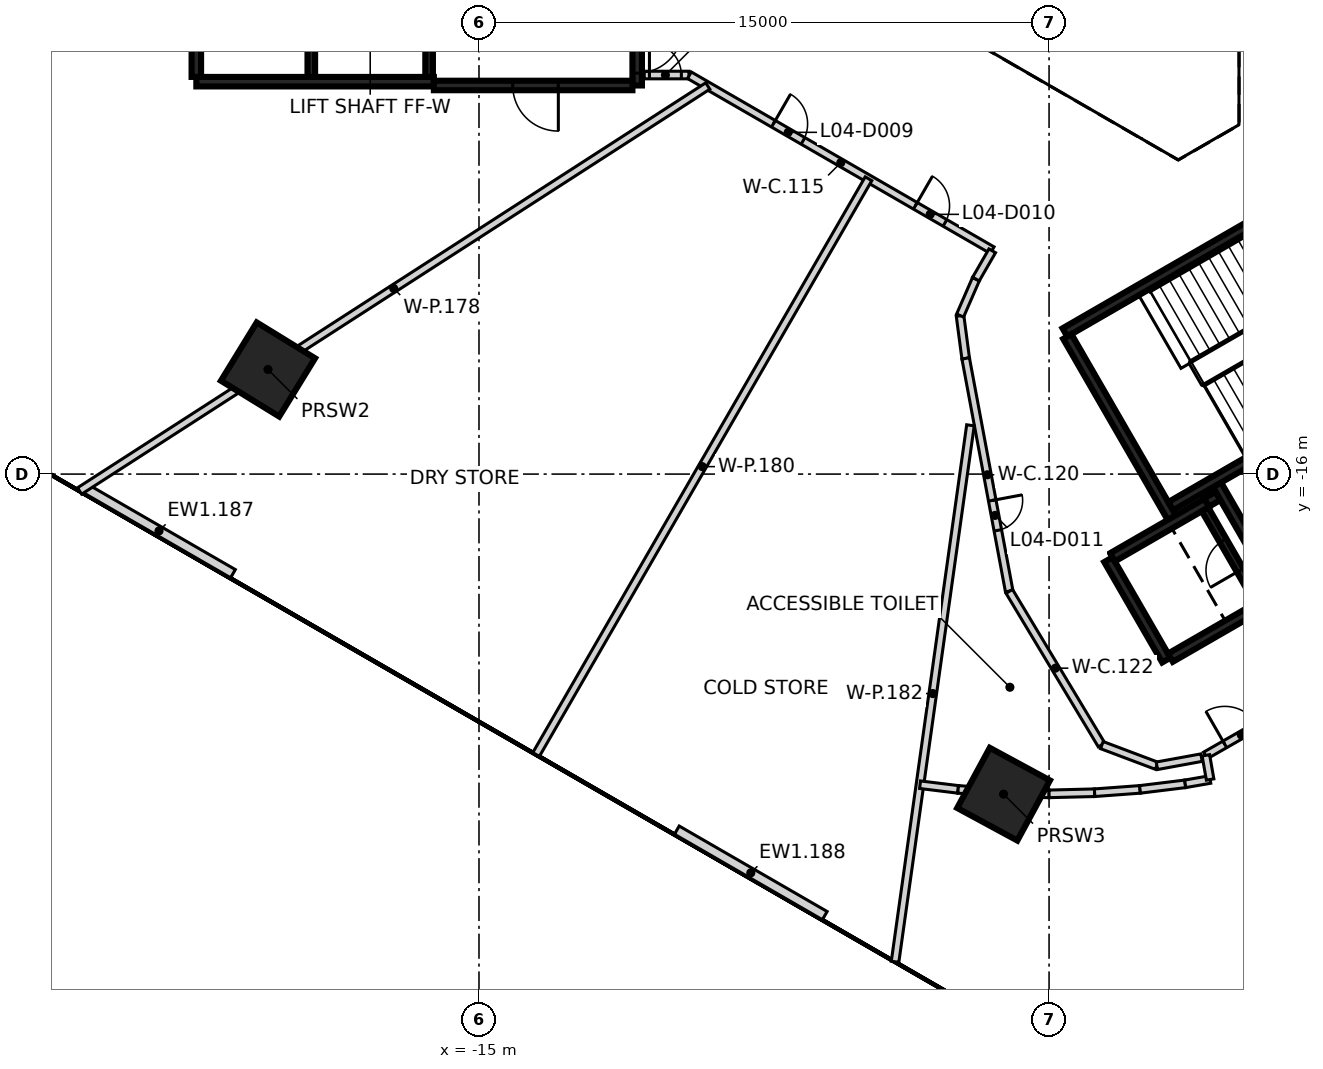
"""IFC4 building model, lengths in metres.
Left out: names, types, materials, properties, quantities, classifications, styles, units other than length and angle.
Written with IfcOpenShell. Run it as: python <this file> out.ifc"""

import sys

from ifc_helpers import new_model, si_unit, direction, frame, frame_2d, origin, origin_2d, place, context, subcontext, project, spatial, rectangle, extrude, element, fill, save


model = new_model("IFC4")
c1 = context("Model", 3, precision=1e-05, world=origin(), true_north=direction((0.0, 1.0)))
c2 = subcontext(c1, "Body", "Model", "MODEL_VIEW")
j1 = project(units=[si_unit("LENGTHUNIT", "METRE"), si_unit("PLANEANGLEUNIT", "RADIAN")], contexts=[c1])
p1 = place(None, origin())
s1 = spatial("IfcSite", under=j1, at=p1, CompositionType="ELEMENT")
p2 = place(p1, origin())
s2 = spatial("IfcBuilding", under=s1, at=p2, CompositionType="ELEMENT")
p3 = place(p2, frame((0.0, 0.0, 24.5)))
s3 = spatial("IfcBuildingStorey", under=s2, at=p3, CompositionType="ELEMENT", Elevation=24.5)
for number, where, z_axis, x_axis in (
    (1, (-20.552, -13.248, -0.45), (0.0, 0.0, 1.0), (0.523, 0.852, 0.0)),
    (2, (-1.197, -24.423, -0.45), (0.0, 0.0, 1.0), (0.476, 0.879, 0.0)),
):
    element("IfcColumn", number, at=place(p3, frame(where, z_axis=z_axis, x_axis=x_axis)), inside=s3, PredefinedType="COLUMN", context=c2, shape_type="SweptSolid", body=[
        extrude(rectangle(XDim=1.8, YDim=1.8, at=origin_2d()), origin(), (0.0, 0.0, 1.0), 5.05),
    ])
p4 = place(p3, frame((-21.473, -18.621, 0.0), z_axis=(0.0, 0.0, 1.0), x_axis=(-0.865894343596, 0.500226934229, 0.0)))
e3 = element("IfcWall", 3, at=p4, inside=s3, PredefinedType="SOLIDWALL", context=c2, shape_type="SweptSolid", body=[
    extrude(rectangle(XDim=4.496, YDim=0.25, at=frame_2d((2.248, 0.0))), origin(), (0.0, 0.0, 1.0), 4.6),
])
p5 = place(p3, frame((-5.902, -27.617, 0.0), z_axis=(0.0, 0.0, 1.0), x_axis=(-0.865880754896, 0.500250455572, 0.0)))
e4 = element("IfcWall", 4, at=p5, inside=s3, PredefinedType="SOLIDWALL", context=c2, shape_type="SweptSolid", body=[
    extrude(rectangle(XDim=4.496, YDim=0.25, at=frame_2d((2.248, 0.0))), origin(), (0.0, 0.0, 1.0), 4.6),
])
p6 = place(p3, frame((-10.837, 5.775, 0.0), z_axis=(0.0, 0.0, 1.0), x_axis=(0.0, -1.0, 0.0)))
e5 = element("IfcWall", 5, at=p6, inside=s3, PredefinedType="SHEAR", context=c2, shape_type="SweptSolid", body=[
    extrude(rectangle(XDim=11.55, YDim=0.25, at=frame_2d((5.775, 0.0))), origin(), (0.0, 0.0, 1.0), 4.6),
])
p7 = place(p6, frame((10.025, 0.0, 0.0)))
e6 = element("IfcOpeningElement", 6, at=p7, cuts=e5, PredefinedType="OPENING", context=c2, shape_type="SweptSolid", body=[
    extrude(rectangle(XDim=1.2, YDim=2.1, at=frame_2d((0.6, 1.05))), frame((0.0, 0.135, 0.0), z_axis=(0.0, -1.0, 0.0), x_axis=(1.0, 0.0, 0.0)), (0.0, 0.0, 1.0), 0.27),
])
p8 = place(p6, frame((8.725, 0.0, 0.0)))
e7 = element("IfcOpeningElement", 7, at=p8, cuts=e5, PredefinedType="OPENING", context=c2, shape_type="SweptSolid", body=[
    extrude(rectangle(XDim=1.2, YDim=2.1, at=frame_2d((0.6, 1.05))), frame((0.0, 0.135, 0.0), z_axis=(0.0, -1.0, 0.0), x_axis=(1.0, 0.0, 0.0)), (0.0, 0.0, 1.0), 0.27),
])
p9 = place(p3, frame((-16.187, -5.675, 0.0), z_axis=(0.0, 0.0, 1.0), x_axis=(-1.0, 0.0, 0.0)))
e8 = element("IfcWall", 8, at=p9, inside=s3, PredefinedType="SHEAR", context=c2, shape_type="SweptSolid", body=[
    extrude(rectangle(XDim=6.25, YDim=0.25, at=frame_2d((3.125, 0.0))), origin(), (0.0, 0.0, 1.0), 4.6),
])
p10 = place(p3, frame((-10.963, -5.775, 0.0), z_axis=(0.0, 0.0, 1.0), x_axis=(-1.0, 0.0, 0.0)))
e9 = element("IfcWall", 9, at=p10, inside=s3, PredefinedType="SHEAR", context=c2, shape_type="SweptSolid", body=[
    extrude(rectangle(XDim=5.225, YDim=0.25, at=frame_2d((2.612, 0.0))), origin(), (0.0, 0.0, 1.0), 4.6),
])
p11 = place(p10, frame((1.95, 0.0, 0.0)))
e10 = element("IfcOpeningElement", 10, at=p11, cuts=e9, PredefinedType="OPENING", context=c2, shape_type="SweptSolid", body=[
    extrude(rectangle(XDim=1.2, YDim=2.1, at=frame_2d((0.6, 1.05))), frame((0.0, 0.135, 0.0), z_axis=(0.0, -1.0, 0.0), x_axis=(1.0, 0.0, 0.0)), (0.0, 0.0, 1.0), 0.27),
])
p12 = place(p3, frame((-22.437, -5.55, 0.0), z_axis=(0.0, 0.0, 1.0), x_axis=(0.0, 1.0, 0.0)))
e11 = element("IfcWall", 11, at=p12, inside=s3, PredefinedType="SHEAR", context=c2, shape_type="SweptSolid", body=[
    extrude(rectangle(XDim=1.849, YDim=0.25, at=frame_2d((0.925, 0.0))), origin(), (0.0, 0.0, 1.0), 4.6),
])
p13 = place(p3, frame((-16.312, -2.898, 0.0), z_axis=(0.0, 0.0, 1.0), x_axis=(0.0, -1.0, 0.0)))
e12 = element("IfcWall", 12, at=p13, inside=s3, PredefinedType="SHEAR", context=c2, shape_type="SweptSolid", body=[
    extrude(rectangle(XDim=2.651, YDim=0.2, at=frame_2d((1.325, 0.0))), origin(), (0.0, 0.0, 1.0), 4.6),
])
p14 = place(p13, frame((0.652, 0.0, 0.0)))
e13 = element("IfcOpeningElement", 13, at=p14, cuts=e12, PredefinedType="OPENING", context=c2, shape_type="SweptSolid", body=[
    extrude(rectangle(XDim=1.3, YDim=2.1, at=frame_2d((0.65, 1.05))), frame((0.0, 0.11, 0.0), z_axis=(0.0, -1.0, 0.0), x_axis=(1.0, 0.0, 0.0)), (0.0, 0.0, 1.0), 0.22),
])
p15 = place(p3, frame((-19.412, -5.549, 0.0), z_axis=(0.0, 0.0, 1.0), x_axis=(0.0, 1.0, 0.0)))
e14 = element("IfcWall", 14, at=p15, inside=s3, PredefinedType="SHEAR", context=c2, shape_type="SweptSolid", body=[
    extrude(rectangle(XDim=2.651, YDim=0.2, at=frame_2d((1.325, 0.0))), origin(), (0.0, 0.0, 1.0), 4.6),
])
p16 = place(p3, frame((0.417, -12.273, 0.0), z_axis=(0.0, 0.0, 1.0), x_axis=(0.866021906294, 0.500006057782, 0.0)))
e15 = element("IfcWall", 15, at=p16, inside=s3, PredefinedType="SHEAR", context=c2, shape_type="SweptSolid", body=[
    extrude(rectangle(XDim=11.55, YDim=0.25, at=frame_2d((5.775, 0.0))), origin(), (0.0, 0.0, 1.0), 4.6),
])
p17 = place(p16, frame((10.025, 0.0, 0.0)))
e16 = element("IfcOpeningElement", 16, at=p17, cuts=e15, PredefinedType="OPENING", context=c2, shape_type="SweptSolid", body=[
    extrude(rectangle(XDim=1.2, YDim=2.1, at=frame_2d((0.6, 1.05))), frame((0.0, 0.135, 0.0), z_axis=(0.0, -1.0, 0.0), x_axis=(1.0, 0.0, 0.0)), (0.0, 0.0, 1.0), 0.27),
])
p18 = place(p16, frame((8.725, 0.0, 0.0)))
e17 = element("IfcOpeningElement", 17, at=p18, cuts=e15, PredefinedType="OPENING", context=c2, shape_type="SweptSolid", body=[
    extrude(rectangle(XDim=1.2, YDim=2.1, at=frame_2d((0.6, 1.05))), frame((0.0, 0.135, 0.0), z_axis=(0.0, -1.0, 0.0), x_axis=(1.0, 0.0, 0.0)), (0.0, 0.0, 1.0), 0.27),
])
p19 = place(p3, frame((3.235, -17.153, 0.0), z_axis=(0.0, 0.0, 1.0), x_axis=(-0.500008851346, 0.866020293397, 0.0)))
e18 = element("IfcWall", 18, at=p19, inside=s3, PredefinedType="SHEAR", context=c2, shape_type="SweptSolid", body=[
    extrude(rectangle(XDim=5.51, YDim=0.25, at=frame_2d((2.755, 0.0))), origin(), (0.0, 0.0, 1.0), 4.6),
])
p20 = place(p3, frame((3.085, -20.894, 0.0), z_axis=(0.0, 0.0, 1.0), x_axis=(-0.499978833458, 0.866037623948, 0.0)))
e19 = element("IfcWall", 19, at=p20, inside=s3, PredefinedType="SHEAR", context=c2, shape_type="SweptSolid", body=[
    extrude(rectangle(XDim=3.05, YDim=0.25, at=frame_2d((1.525, 0.0))), origin(), (0.0, 0.0, 1.0), 4.6),
])
p21 = place(p3, frame((1.669, -18.19, 0.0), z_axis=(0.0, 0.0, 1.0), x_axis=(0.866042235819, 0.499970844928, 0.0)))
e20 = element("IfcWall", 20, at=p21, inside=s3, PredefinedType="SHEAR", context=c2, shape_type="SweptSolid", body=[
    extrude(rectangle(XDim=2.865, YDim=0.25, at=frame_2d((1.432, 0.0))), origin(), (0.0, 0.0, 1.0), 4.6),
])
p22 = place(p3, frame((5.675, -19.399, 0.0), z_axis=(0.0, 0.0, 1.0), x_axis=(-0.866026637627, -0.499997862916, 0.0)))
e21 = element("IfcWall", 21, at=p22, inside=s3, PredefinedType="SHEAR", context=c2, shape_type="SweptSolid", body=[
    extrude(rectangle(XDim=2.865, YDim=0.25, at=frame_2d((1.432, 0.0))), origin(), (0.0, 0.0, 1.0), 4.6),
])
p23 = place(p3, frame((4.414, -16.276, 0.0), z_axis=(0.0, 0.0, 1.0), x_axis=(0.500003324108, -0.866023484601, 0.0)))
e22 = element("IfcWall", 22, at=p23, inside=s3, PredefinedType="SHEAR", context=c2, shape_type="SweptSolid", body=[
    extrude(rectangle(XDim=3.085, YDim=0.25, at=frame_2d((1.542, 0.0))), origin(), (0.0, 0.0, 1.0), 4.6),
])
p24 = place(p3, frame((5.322, -15.619, 0.0), z_axis=(0.0, 0.0, 1.0), x_axis=(-0.866026229868, -0.499998569178, 0.0)))
e23 = element("IfcWall", 23, at=p24, inside=s3, PredefinedType="SHEAR", context=c2, shape_type="SweptSolid", body=[
    extrude(rectangle(XDim=2.449, YDim=0.25, at=frame_2d((1.225, 0.0))), origin(), (0.0, 0.0, 1.0), 4.6),
])
p25 = place(p3, frame((4.145, -16.749, 0.0), z_axis=(0.0, 0.0, 1.0), x_axis=(0.866185586049, 0.49972245349, 0.0)))
e24 = element("IfcWall", 24, at=p25, inside=s3, PredefinedType="SHEAR", context=c2, shape_type="SweptSolid", body=[
    extrude(rectangle(XDim=0.344, YDim=0.25, at=frame_2d((0.172, 0.0))), origin(), (0.0, 0.0, 1.0), 4.6),
])
p26 = place(p3, frame((5.503, -19.352, 0.0), z_axis=(0.0, 0.0, 1.0), x_axis=(-0.499986818241, 0.866033014143, 0.0)))
e25 = element("IfcWall", 25, at=p26, inside=s3, PredefinedType="SHEAR", context=c2, shape_type="SweptSolid", body=[
    extrude(rectangle(XDim=2.798, YDim=0.2, at=frame_2d((1.399, 0.0))), origin(), (0.0, 0.0, 1.0), 4.6),
])
p27 = place(p26, frame((0.949, 0.0, 0.0)))
e26 = element("IfcOpeningElement", 26, at=p27, cuts=e25, PredefinedType="OPENING", context=c2, shape_type="SweptSolid", body=[
    extrude(rectangle(XDim=0.9, YDim=2.1, at=frame_2d((0.45, 1.05))), frame((0.0, 0.11, 0.0), z_axis=(0.0, -1.0, 0.0), x_axis=(1.0, 0.0, 0.0)), (0.0, 0.0, 1.0), 0.22),
])
p28 = place(p3, frame((-10.652, -5.5, 0.0), z_axis=(0.0, 0.0, 1.0), x_axis=(1.0, 0.0, 0.0)))
e27 = element("IfcWall", 27, at=p28, inside=s3, PredefinedType="PARTITIONING", context=c2, shape_type="SweptSolid", body=[
    extrude(rectangle(XDim=1.177, YDim=0.2, at=frame_2d((0.589, 0.0))), origin(), (0.0, 0.0, 1.0), 4.6),
])
p29 = place(p28, frame((0.137, 0.0, 0.0)))
e28 = element("IfcOpeningElement", 28, at=p29, cuts=e27, PredefinedType="OPENING", context=c2, shape_type="SweptSolid", body=[
    extrude(rectangle(XDim=0.84, YDim=2.1, at=frame_2d((0.42, 1.05))), frame((0.0, 0.11, 0.0), z_axis=(0.0, -1.0, 0.0), x_axis=(1.0, 0.0, 0.0)), (0.0, 0.0, 1.0), 0.22),
])
p30 = place(p3, frame((-9.463, -5.506, 0.0), z_axis=(0.0, 0.0, 1.0), x_axis=(0.865865073245, -0.500277597875, 0.0)))
e29 = element("IfcWall", 29, at=p30, inside=s3, PredefinedType="PARTITIONING", context=c2, shape_type="SweptSolid", body=[
    extrude(rectangle(XDim=9.199, YDim=0.2, at=frame_2d((4.6, 0.0))), origin(), (0.0, 0.0, 1.0), 4.6),
])
p31 = place(p30, frame((2.552, 0.0, 0.0)))
e30 = element("IfcOpeningElement", 30, at=p31, cuts=e29, PredefinedType="OPENING", context=c2, shape_type="SweptSolid", body=[
    extrude(rectangle(XDim=0.9, YDim=2.1, at=frame_2d((0.45, 1.05))), frame((0.0, 0.11, 0.0), z_axis=(0.0, -1.0, 0.0), x_axis=(1.0, 0.0, 0.0)), (0.0, 0.0, 1.0), 0.22),
])
p32 = place(p30, frame((6.866, 0.0, 0.0)))
e31 = element("IfcOpeningElement", 31, at=p32, cuts=e29, PredefinedType="OPENING", context=c2, shape_type="SweptSolid", body=[
    extrude(rectangle(XDim=0.9, YDim=2.1, at=frame_2d((0.45, 1.05))), frame((0.0, 0.11, 0.0), z_axis=(0.0, -1.0, 0.0), x_axis=(1.0, 0.0, 0.0)), (0.0, 0.0, 1.0), 0.22),
])
p33 = place(p3, frame((-2.342, -11.835, 0.0), z_axis=(0.0, 0.0, 1.0), x_axis=(0.130834272089, -0.991404253192, 0.0)))
e32 = element("IfcWall", 32, at=p33, inside=s3, PredefinedType="PARTITIONING", context=c2, shape_type="SweptSolid", body=[
    extrude(rectangle(XDim=1.131, YDim=0.2, at=frame_2d((0.565, 0.0))), origin(), (0.0, 0.0, 1.0), 4.6),
])
p34 = place(p3, frame((-2.341, -11.828, 0.0), z_axis=(0.0, 0.0, 1.0), x_axis=(0.399428841439, 0.916764201214, 0.0)))
e33 = element("IfcWall", 33, at=p34, inside=s3, PredefinedType="PARTITIONING", context=c2, shape_type="SweptSolid", body=[
    extrude(rectangle(XDim=1.042, YDim=0.2, at=frame_2d((0.521, 0.0))), origin(), (0.0, 0.0, 1.0), 4.6),
])
p35 = place(p3, frame((-2.194, -12.956, 0.0), z_axis=(0.0, 0.0, 1.0), x_axis=(0.183749054017, -0.982973186383, 0.0)))
e34 = element("IfcWall", 34, at=p35, inside=s3, PredefinedType="PARTITIONING", context=c2, shape_type="SweptSolid", body=[
    extrude(rectangle(XDim=6.23, YDim=0.2, at=frame_2d((3.115, 0.0))), origin(), (0.0, 0.0, 1.0), 4.6),
])
p36 = place(p35, frame((3.802, 0.0, 0.0)))
e35 = element("IfcOpeningElement", 35, at=p36, cuts=e34, PredefinedType="OPENING", context=c2, shape_type="SweptSolid", body=[
    extrude(rectangle(XDim=0.8, YDim=2.1, at=frame_2d((0.4, 1.05))), frame((0.0, 0.11, 0.0), z_axis=(0.0, -1.0, 0.0), x_axis=(1.0, 0.0, 0.0)), (0.0, 0.0, 1.0), 0.22),
])
p37 = place(p3, frame((-1.924, -10.869, 0.0), z_axis=(0.0, 0.0, 1.0), x_axis=(0.499533742691, 0.866294430268, 0.0)))
e36 = element("IfcWall", 36, at=p37, inside=s3, PredefinedType="PARTITIONING", context=c2, shape_type="SweptSolid", body=[
    extrude(rectangle(XDim=0.859, YDim=0.2, at=frame_2d((0.429, 0.0))), origin(), (0.0, 0.0, 1.0), 4.6),
])
p38 = place(p3, frame((-1.047, -19.086, 0.0), z_axis=(0.0, 0.0, 1.0), x_axis=(0.515211359032, -0.857063157255, 0.0)))
e37 = element("IfcWall", 37, at=p38, inside=s3, PredefinedType="PARTITIONING", context=c2, shape_type="SweptSolid", body=[
    extrude(rectangle(XDim=4.715, YDim=0.2, at=frame_2d((2.357, 0.0))), origin(), (0.0, 0.0, 1.0), 4.6),
])
p39 = place(p3, frame((1.389, -23.131, 0.0), z_axis=(0.0, 0.0, 1.0), x_axis=(0.935814533732, -0.352492777879, 0.0)))
e38 = element("IfcWall", 38, at=p39, inside=s3, PredefinedType="PARTITIONING", context=c2, shape_type="SweptSolid", body=[
    extrude(rectangle(XDim=1.543, YDim=0.2, at=frame_2d((0.771, 0.0))), origin(), (0.0, 0.0, 1.0), 4.6),
])
p40 = place(p3, frame((2.837, -23.675, 0.0), z_axis=(0.0, 0.0, 1.0), x_axis=(0.983774851332, 0.179407474447, 0.0)))
e39 = element("IfcWall", 39, at=p40, inside=s3, PredefinedType="PARTITIONING", context=c2, shape_type="SweptSolid", body=[
    extrude(rectangle(XDim=1.193, YDim=0.2, at=frame_2d((0.597, 0.0))), origin(), (0.0, 0.0, 1.0), 4.6),
])
p41 = place(p3, frame((4.116, -23.403, 0.0), z_axis=(0.0, 0.0, 1.0), x_axis=(0.867855523063, 0.49681665742, 0.0)))
e40 = element("IfcWall", 40, at=p41, inside=s3, PredefinedType="PARTITIONING", context=c2, shape_type="SweptSolid", body=[
    extrude(rectangle(XDim=2.172, YDim=0.2, at=frame_2d((1.086, 0.0))), origin(), (0.0, 0.0, 1.0), 4.6),
])
p42 = place(p41, frame((0.586, 0.0, 0.0)))
e41 = element("IfcOpeningElement", 41, at=p42, cuts=e40, PredefinedType="OPENING", context=c2, shape_type="SweptSolid", body=[
    extrude(rectangle(XDim=1.0, YDim=2.1, at=frame_2d((0.5, 1.05))), frame((0.0, 0.11, 0.0), z_axis=(0.0, -1.0, 0.0), x_axis=(1.0, 0.0, 0.0)), (0.0, 0.0, 1.0), 0.22),
])
p43 = place(p3, frame((-25.509, -16.444, 0.0), z_axis=(0.0, 0.0, 1.0), x_axis=(0.840502189504, 0.541808148184, 0.0)))
e42 = element("IfcWall", 42, at=p43, inside=s3, PredefinedType="PARTITIONING", context=c2, shape_type="SweptSolid", body=[
    extrude(rectangle(XDim=19.666, YDim=0.2, at=frame_2d((9.833, 0.0))), origin(), (0.0, 0.0, 1.0), 4.6),
])
p44 = place(p3, frame((-13.498, -23.378, 0.0), z_axis=(0.0, 0.0, 1.0), x_axis=(0.500002732974, 0.866023825895, 0.0)))
e43 = element("IfcWall", 43, at=p44, inside=s3, PredefinedType="PARTITIONING", context=c2, shape_type="SweptSolid", body=[
    extrude(rectangle(XDim=17.493, YDim=0.2, at=frame_2d((8.747, 0.0))), origin(), (0.0, 0.0, 1.0), 4.6),
])
p45 = place(p3, frame((-4.052, -28.832, 0.0), z_axis=(0.0, 0.0, 1.0), x_axis=(0.139178988917, 0.990267241225, 0.0)))
e44 = element("IfcWall", 44, at=p45, inside=s3, PredefinedType="PARTITIONING", context=c2, shape_type="SweptSolid", body=[
    extrude(rectangle(XDim=14.254, YDim=0.2, at=frame_2d((7.127, 0.0))), origin(), (0.0, 0.0, 1.0), 4.6),
])
p46 = place(p3, frame((-3.395, -24.173, 0.0), z_axis=(0.0, 0.0, 1.0), x_axis=(0.992572686874, -0.121653036427, 0.0)))
e45 = element("IfcWall", 45, at=p46, inside=s3, PredefinedType="PARTITIONING", context=c2, shape_type="SweptSolid", body=[
    extrude(rectangle(XDim=1.01, YDim=0.2, at=frame_2d((0.505, 0.0))), origin(), (0.0, 0.0, 1.0), 4.6),
])
p47 = place(p3, frame((-2.393, -24.296, 0.0), z_axis=(0.0, 0.0, 1.0), x_axis=(0.997291605881, -0.073548982579, 0.0)))
e46 = element("IfcWall", 46, at=p47, inside=s3, PredefinedType="PARTITIONING", context=c2, shape_type="SweptSolid", body=[
    extrude(rectangle(XDim=1.198, YDim=0.2, at=frame_2d((0.599, 0.0))), origin(), (0.0, 0.0, 1.0), 4.6),
])
for number, where, z_axis, x_axis in (
    (47, (-1.198, -24.384, 0.0), (0.0, 0.0, 1.0), (1.0, -0.025, 0.0)),
    (48, (0.0, -24.414, 0.0), (0.0, 0.0, 1.0), (1.0, 0.025, 0.0)),
):
    element("IfcWall", number, at=place(p3, frame(where, z_axis=z_axis, x_axis=x_axis)), inside=s3, PredefinedType="PARTITIONING", context=c2, shape_type="SweptSolid", body=[
        extrude(rectangle(XDim=1.198, YDim=0.2, at=frame_2d((0.599, 0.0))), origin(), (0.0, 0.0, 1.0), 4.6),
    ])
p48 = place(p3, frame((1.198, -24.384, 0.0), z_axis=(0.0, 0.0, 1.0), x_axis=(0.997291605881, 0.073548982579, 0.0)))
e49 = element("IfcWall", 49, at=p48, inside=s3, PredefinedType="PARTITIONING", context=c2, shape_type="SweptSolid", body=[
    extrude(rectangle(XDim=1.198, YDim=0.2, at=frame_2d((0.599, 0.0))), origin(), (0.0, 0.0, 1.0), 4.6),
])
p49 = place(p3, frame((2.393, -24.296, 0.0), z_axis=(0.0, 0.0, 1.0), x_axis=(0.992545185506, 0.12187721169, 0.0)))
e50 = element("IfcWall", 50, at=p49, inside=s3, PredefinedType="PARTITIONING", context=c2, shape_type="SweptSolid", body=[
    extrude(rectangle(XDim=1.198, YDim=0.2, at=frame_2d((0.599, 0.0))), origin(), (0.0, 0.0, 1.0), 4.6),
])
p50 = place(p3, frame((3.582, -24.15, 0.0), z_axis=(0.0, 0.0, 1.0), x_axis=(0.985230586733, 0.171232855975, 0.0)))
e51 = element("IfcWall", 51, at=p50, inside=s3, PredefinedType="PARTITIONING", context=c2, shape_type="SweptSolid", body=[
    extrude(rectangle(XDim=0.666, YDim=0.2, at=frame_2d((0.333, 0.0))), origin(), (0.0, 0.0, 1.0), 4.6),
])
p51 = place(p3, frame((4.126, -23.4, 0.0), z_axis=(0.0, 0.0, 1.0), x_axis=(0.173526526228, -0.984829195696, 0.0)))
e52 = element("IfcWall", 52, at=p51, inside=s3, PredefinedType="PARTITIONING", context=c2, shape_type="SweptSolid", body=[
    extrude(rectangle(XDim=0.646, YDim=0.2, at=frame_2d((0.323, 0.0))), origin(), (0.0, 0.0, 1.0), 4.6),
])
p52 = place(p7, origin())
e53 = element("IfcDoor", 53, at=p52, inside=s3, OperationType="SINGLE_SWING_LEFT", PredefinedType="DOOR", context=c2, shape_type="SweptSolid", body=[
    extrude(rectangle(XDim=1.2, YDim=2.1, at=frame_2d((0.6, 1.05))), frame((0.0, 0.025, 0.0), z_axis=(0.0, -1.0, 0.0), x_axis=(1.0, 0.0, 0.0)), (0.0, 0.0, 1.0), 0.05),
])
fill(e6, e53)
p53 = place(p27, origin())
e54 = element("IfcDoor", 54, at=p53, inside=s3, OperationType="SINGLE_SWING_LEFT", PredefinedType="DOOR", context=c2, shape_type="SweptSolid", body=[
    extrude(rectangle(XDim=0.9, YDim=2.1, at=frame_2d((0.45, 1.05))), frame((0.0, 0.025, 0.0), z_axis=(0.0, -1.0, 0.0), x_axis=(1.0, 0.0, 0.0)), (0.0, 0.0, 1.0), 0.05),
])
fill(e26, e54)
p54 = place(p11, origin())
e55 = element("IfcDoor", 55, at=p54, inside=s3, OperationType="SINGLE_SWING_RIGHT", PredefinedType="DOOR", context=c2, shape_type="SweptSolid", body=[
    extrude(rectangle(XDim=1.2, YDim=2.1, at=frame_2d((0.6, 1.05))), frame((0.0, 0.025, 0.0), z_axis=(0.0, -1.0, 0.0), x_axis=(1.0, 0.0, 0.0)), (0.0, 0.0, 1.0), 0.05),
])
fill(e10, e55)
p55 = place(p29, origin())
e56 = element("IfcDoor", 56, at=p55, inside=s3, OperationType="SINGLE_SWING_LEFT", PredefinedType="DOOR", context=c2, shape_type="SweptSolid", body=[
    extrude(rectangle(XDim=0.84, YDim=2.1, at=frame_2d((0.42, 1.05))), frame((0.0, 0.025, 0.0), z_axis=(0.0, -1.0, 0.0), x_axis=(1.0, 0.0, 0.0)), (0.0, 0.0, 1.0), 0.05),
])
fill(e28, e56)
p56 = place(p31, frame((0.9, 0.0, 0.0), z_axis=(0.0, 0.0, 1.0), x_axis=(-1.0, 0.0, 0.0)))
e57 = element("IfcDoor", 57, at=p56, inside=s3, OperationType="SINGLE_SWING_LEFT", PredefinedType="DOOR", context=c2, shape_type="SweptSolid", body=[
    extrude(rectangle(XDim=0.9, YDim=2.1, at=frame_2d((0.45, 1.05))), frame((0.0, 0.025, 0.0), z_axis=(0.0, -1.0, 0.0), x_axis=(1.0, 0.0, 0.0)), (0.0, 0.0, 1.0), 0.05),
])
fill(e30, e57)
p57 = place(p32, frame((0.9, 0.0, 0.0), z_axis=(0.0, 0.0, 1.0), x_axis=(-1.0, 0.0, 0.0)))
e58 = element("IfcDoor", 58, at=p57, inside=s3, OperationType="SINGLE_SWING_LEFT", PredefinedType="DOOR", context=c2, shape_type="SweptSolid", body=[
    extrude(rectangle(XDim=0.9, YDim=2.1, at=frame_2d((0.45, 1.05))), frame((0.0, 0.025, 0.0), z_axis=(0.0, -1.0, 0.0), x_axis=(1.0, 0.0, 0.0)), (0.0, 0.0, 1.0), 0.05),
])
fill(e31, e58)
p58 = place(p36, frame((0.8, 0.0, 0.0), z_axis=(0.0, 0.0, 1.0), x_axis=(-1.0, 0.0, 0.0)))
e59 = element("IfcDoor", 59, at=p58, inside=s3, OperationType="SINGLE_SWING_LEFT", PredefinedType="DOOR", context=c2, shape_type="SweptSolid", body=[
    extrude(rectangle(XDim=0.8, YDim=2.1, at=frame_2d((0.4, 1.05))), frame((0.0, 0.025, 0.0), z_axis=(0.0, -1.0, 0.0), x_axis=(1.0, 0.0, 0.0)), (0.0, 0.0, 1.0), 0.05),
])
fill(e35, e59)
p59 = place(p42, frame((1.0, 0.0, 0.0), z_axis=(0.0, 0.0, 1.0), x_axis=(-1.0, 0.0, 0.0)))
e60 = element("IfcDoor", 60, at=p59, inside=s3, OperationType="SINGLE_SWING_LEFT", PredefinedType="DOOR", context=c2, shape_type="SweptSolid", body=[
    extrude(rectangle(XDim=1.0, YDim=2.1, at=frame_2d((0.5, 1.05))), frame((0.0, 0.025, 0.0), z_axis=(0.0, -1.0, 0.0), x_axis=(1.0, 0.0, 0.0)), (0.0, 0.0, 1.0), 0.05),
])
fill(e41, e60)
save(model, sys.argv[1])
